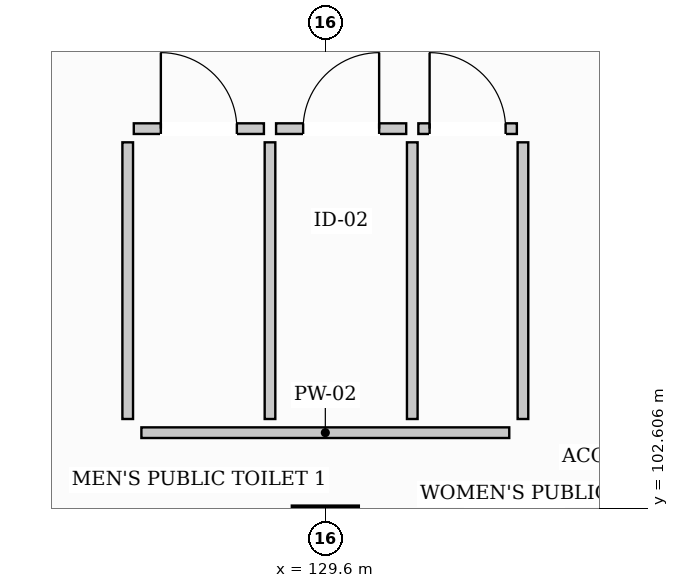
"""IFC4 building model, lengths in metres.
Left out: names, types, materials, properties, quantities, classifications, styles, units other than length and angle.
Written with IfcOpenShell. Run it as: python <this file> out.ifc"""

import sys

from ifc_helpers import new_model, si_unit, direction, frame, frame_2d, origin, origin_2d, place, context, subcontext, project, spatial, rectangle, extrude, element, fill, save


model = new_model("IFC4")
c1 = context("Model", 3, precision=1e-05, world=origin(), true_north=direction((0.0, 1.0)))
c2 = subcontext(c1, "Body", "Model", "MODEL_VIEW")
j1 = project(units=[si_unit("LENGTHUNIT", "METRE"), si_unit("PLANEANGLEUNIT", "RADIAN")], contexts=[c1])
p1 = place(None, origin())
s1 = spatial("IfcSite", under=j1, at=p1, CompositionType="ELEMENT")
p2 = place(p1, origin())
s2 = spatial("IfcBuilding", under=s1, at=p2, CompositionType="ELEMENT")
p3 = place(p2, frame((0.0, 0.0, 5.1)))
s3 = spatial("IfcBuildingStorey", under=s2, at=p3, CompositionType="ELEMENT", Elevation=5.1)
p4 = place(p3, frame((129.6, 102.2, 0.0), z_axis=(0.0, 0.0, 1.0), x_axis=(1.0, 0.0, 0.0)))
e1 = element("IfcColumn", 1, at=p4, inside=s3, PredefinedType="COLUMN", context=c2, shape_type="SweptSolid", body=[
    extrude(rectangle(XDim=0.85, YDim=0.85, at=origin_2d()), origin(), (0.0, 0.0, 1.0), 4.5),
])
p5 = place(p3, frame((127.18, 103.6, 0.0), z_axis=(0.0, 0.0, 1.0), x_axis=(1.0, 0.0, 0.0)))
e2 = element("IfcWall", 2, at=p5, inside=s3, PredefinedType="PARTITIONING", context=c2, shape_type="SweptSolid", body=[
    extrude(rectangle(XDim=4.84, YDim=0.14, at=frame_2d((2.42, 0.0))), origin(), (0.0, 0.0, 1.0), 3.91),
])
for number, where, z_axis, x_axis in (
    (3, (127.0, 103.78, 0.0), (0.0, 0.0, 1.0), (0.0, 1.0, 0.0)),
    (4, (132.2, 103.78, 0.0), (0.0, 0.0, 1.0), (0.0, 1.0, 0.0)),
    (5, (128.872, 103.78, 0.0), (0.0, 0.0, 1.0), (0.0, 1.0, 0.0)),
    (6, (130.744, 103.78, 0.0), (0.0, 0.0, 1.0), (0.0, 1.0, 0.0)),
):
    element("IfcWall", number, at=place(p3, frame(where, z_axis=z_axis, x_axis=x_axis)), inside=s3, PredefinedType="PARTITIONING", context=c2, shape_type="SweptSolid", body=[
        extrude(rectangle(XDim=3.64, YDim=0.14, at=frame_2d((1.82, 0.0))), origin(), (0.0, 0.0, 1.0), 4.22),
    ])
p6 = place(p3, frame((127.08, 107.6, 0.0), z_axis=(0.0, 0.0, 1.0), x_axis=(1.0, 0.0, 0.0)))
e7 = element("IfcWall", 7, at=p6, inside=s3, PredefinedType="PARTITIONING", context=c2, shape_type="SweptSolid", body=[
    extrude(rectangle(XDim=1.712, YDim=0.14, at=frame_2d((0.856, 0.0))), origin(), (0.0, 0.0, 1.0), 4.22),
])
p7 = place(p6, frame((0.356, 0.0, 0.0)))
e8 = element("IfcOpeningElement", 8, at=p7, cuts=e7, PredefinedType="OPENING", context=c2, shape_type="SweptSolid", body=[
    extrude(rectangle(XDim=1.0, YDim=2.15, at=frame_2d((0.5, 1.075))), frame((0.0, 0.08, 0.0), z_axis=(0.0, -1.0, 0.0), x_axis=(1.0, 0.0, 0.0)), (0.0, 0.0, 1.0), 0.16),
])
p8 = place(p3, frame((128.952, 107.6, 0.0), z_axis=(0.0, 0.0, 1.0), x_axis=(1.0, 0.0, 0.0)))
e9 = element("IfcWall", 9, at=p8, inside=s3, PredefinedType="PARTITIONING", context=c2, shape_type="SweptSolid", body=[
    extrude(rectangle(XDim=1.712, YDim=0.14, at=frame_2d((0.856, 0.0))), origin(), (0.0, 0.0, 1.0), 3.91),
])
p9 = place(p8, frame((0.356, 0.0, 0.0)))
e10 = element("IfcOpeningElement", 10, at=p9, cuts=e9, PredefinedType="OPENING", context=c2, shape_type="SweptSolid", body=[
    extrude(rectangle(XDim=1.0, YDim=2.15, at=frame_2d((0.5, 1.075))), frame((0.0, 0.08, 0.0), z_axis=(0.0, -1.0, 0.0), x_axis=(1.0, 0.0, 0.0)), (0.0, 0.0, 1.0), 0.16),
])
p10 = place(p3, frame((130.824, 107.6, 0.0), z_axis=(0.0, 0.0, 1.0), x_axis=(1.0, 0.0, 0.0)))
e11 = element("IfcWall", 11, at=p10, inside=s3, PredefinedType="PARTITIONING", context=c2, shape_type="SweptSolid", body=[
    extrude(rectangle(XDim=1.296, YDim=0.14, at=frame_2d((0.648, 0.0))), origin(), (0.0, 0.0, 1.0), 4.22),
])
p11 = place(p10, frame((0.148, 0.0, 0.0)))
e12 = element("IfcOpeningElement", 12, at=p11, cuts=e11, PredefinedType="OPENING", context=c2, shape_type="SweptSolid", body=[
    extrude(rectangle(XDim=1.0, YDim=2.15, at=frame_2d((0.5, 1.075))), frame((0.0, 0.08, 0.0), z_axis=(0.0, -1.0, 0.0), x_axis=(1.0, 0.0, 0.0)), (0.0, 0.0, 1.0), 0.16),
])
p12 = place(p7, origin())
e13 = element("IfcDoor", 13, at=p12, inside=s3, OperationType="SINGLE_SWING_LEFT", PredefinedType="DOOR", context=c2, shape_type="SweptSolid", body=[
    extrude(rectangle(XDim=1.0, YDim=2.15, at=frame_2d((0.5, 1.075))), frame((0.0, 0.025, 0.0), z_axis=(0.0, -1.0, 0.0), x_axis=(1.0, 0.0, 0.0)), (0.0, 0.0, 1.0), 0.05),
])
fill(e8, e13)
p13 = place(p9, origin())
e14 = element("IfcDoor", 14, at=p13, inside=s3, OperationType="SINGLE_SWING_RIGHT", PredefinedType="DOOR", context=c2, shape_type="SweptSolid", body=[
    extrude(rectangle(XDim=1.0, YDim=2.15, at=frame_2d((0.5, 1.075))), frame((0.0, 0.025, 0.0), z_axis=(0.0, -1.0, 0.0), x_axis=(1.0, 0.0, 0.0)), (0.0, 0.0, 1.0), 0.05),
])
fill(e10, e14)
p14 = place(p11, origin())
e15 = element("IfcDoor", 15, at=p14, inside=s3, OperationType="SINGLE_SWING_LEFT", PredefinedType="DOOR", context=c2, shape_type="SweptSolid", body=[
    extrude(rectangle(XDim=1.0, YDim=2.15, at=frame_2d((0.5, 1.075))), frame((0.0, 0.025, 0.0), z_axis=(0.0, -1.0, 0.0), x_axis=(1.0, 0.0, 0.0)), (0.0, 0.0, 1.0), 0.05),
])
fill(e12, e15)
save(model, sys.argv[1])
